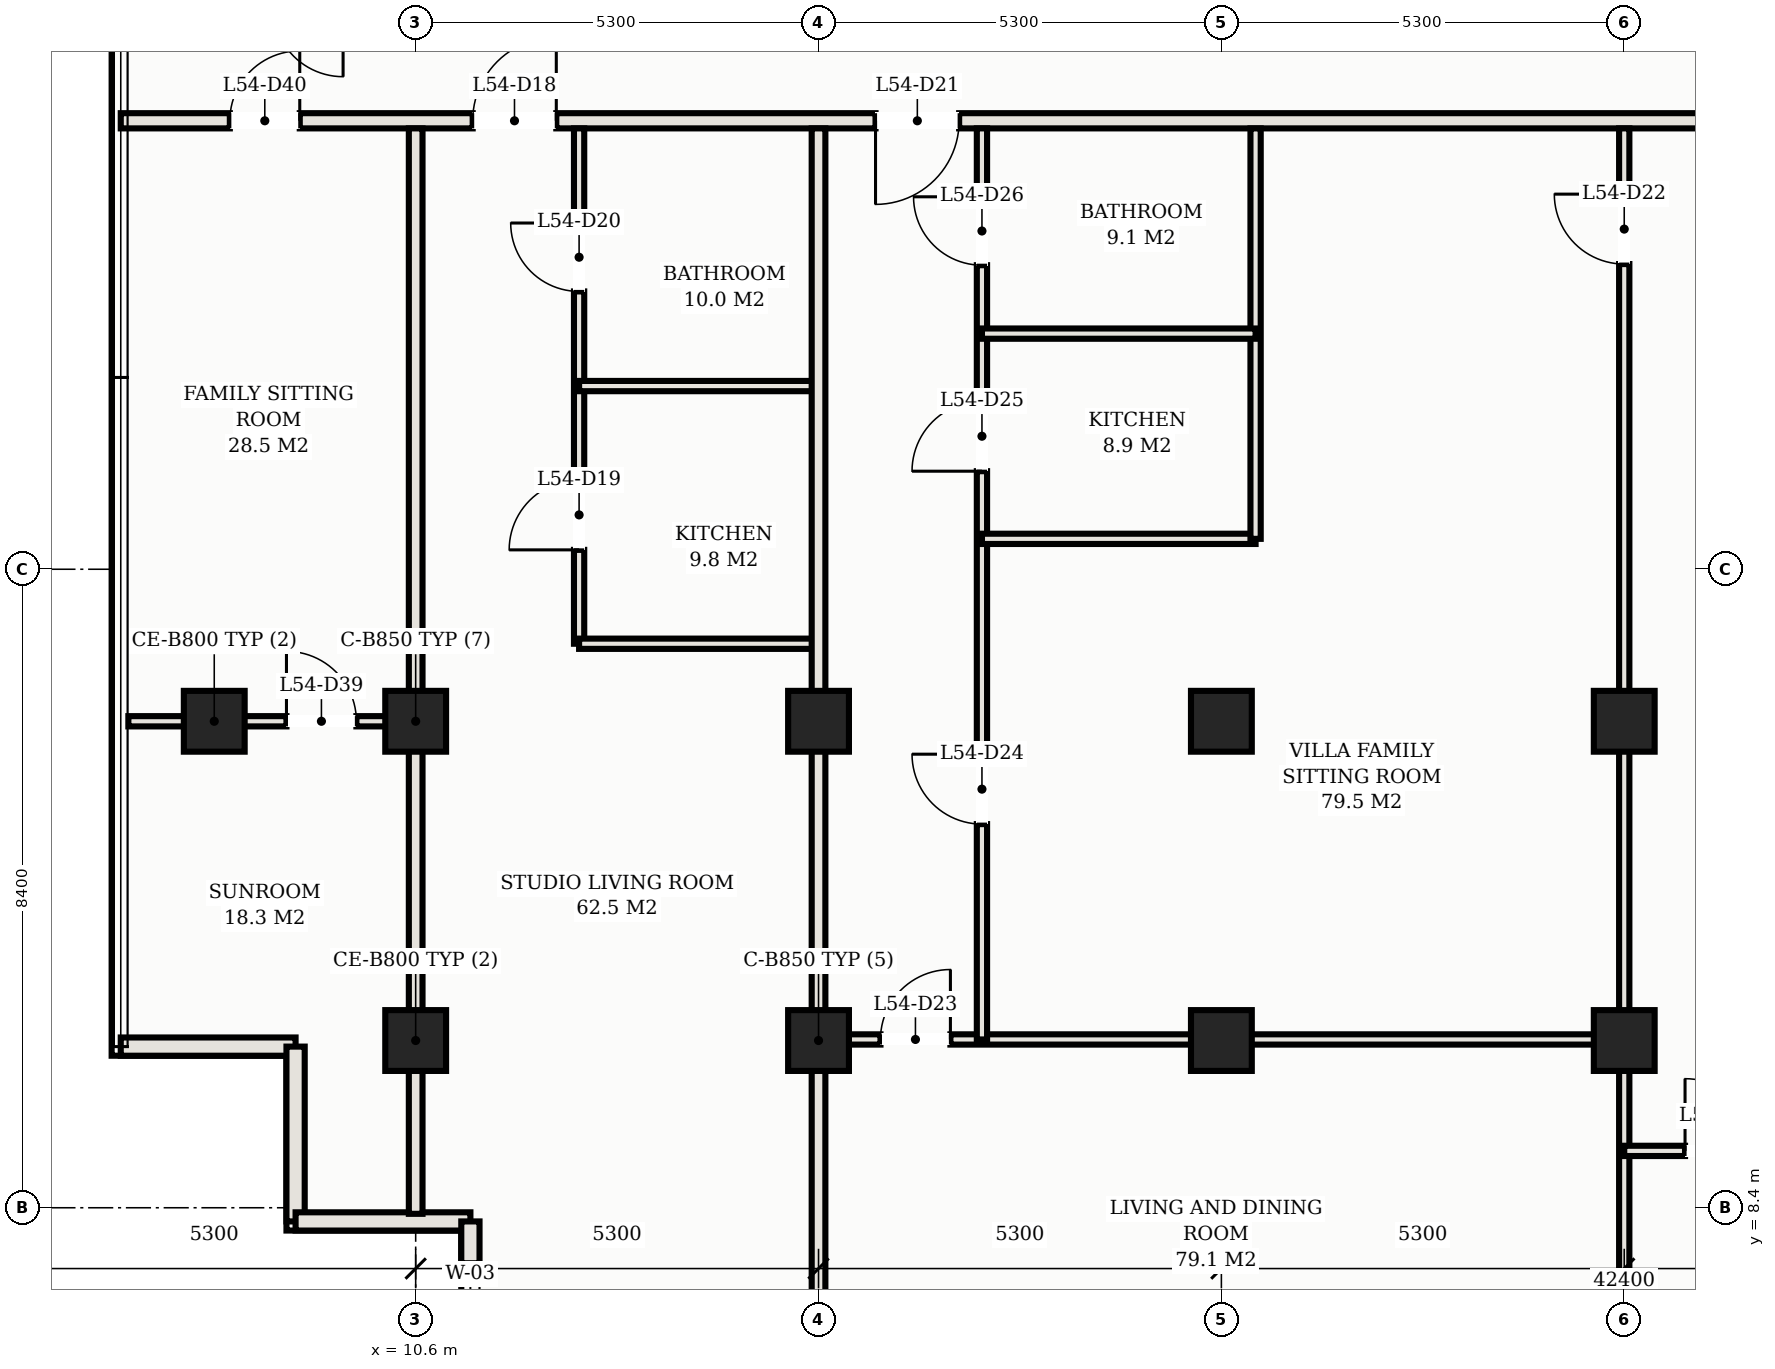
"""IFC4 building model, lengths in metres.
Left out: names, types, materials, properties, quantities, classifications, styles, units other than length and angle.
Written with IfcOpenShell. Run it as: python <this file> out.ifc"""

import sys

from ifc_helpers import new_model, si_unit, direction, frame, frame_2d, origin, origin_2d, place, context, subcontext, project, spatial, rectangle, hollow_rectangle, extrude, element, fill, save


model = new_model("IFC4")
c1 = context("Model", 3, precision=1e-05, world=origin(), true_north=direction((0.0, 1.0)))
c2 = subcontext(c1, "Body", "Model", "MODEL_VIEW")
j1 = project(units=[si_unit("LENGTHUNIT", "METRE"), si_unit("PLANEANGLEUNIT", "RADIAN")], contexts=[c1])
p1 = place(None, origin())
s1 = spatial("IfcSite", under=j1, at=p1, CompositionType="ELEMENT")
p2 = place(p1, origin())
s2 = spatial("IfcBuilding", under=s1, at=p2, CompositionType="ELEMENT")
p3 = place(p2, frame((0.0, 0.0, 200.0)))
s3 = spatial("IfcBuildingStorey", under=s2, at=p3, CompositionType="ELEMENT", Elevation=200.0)
for number, where, z_axis, x_axis in (
    (1, (10.6, 14.8, 0.0), (0.0, 0.0, 1.0), (1.0, 0.0, 0.0)),
    (2, (10.6, 10.6, 0.0), (0.0, 0.0, 1.0), (1.0, 0.0, 0.0)),
    (3, (15.9, 14.8, 0.0), (0.0, 0.0, 1.0), (1.0, 0.0, 0.0)),
    (4, (15.9, 10.6, 0.0), (0.0, 0.0, 1.0), (1.0, 0.0, 0.0)),
    (5, (21.2, 14.8, 0.0), (0.0, 0.0, 1.0), (1.0, 0.0, 0.0)),
    (6, (21.2, 10.6, 0.0), (0.0, 0.0, 1.0), (1.0, 0.0, 0.0)),
    (7, (26.5, 14.8, 0.0), (0.0, 0.0, 1.0), (1.0, 0.0, 0.0)),
    (8, (26.5, 10.6, 0.0), (0.0, 0.0, 1.0), (1.0, 0.0, 0.0)),
    (9, (7.95, 14.8, 0.0), (0.0, 0.0, 1.0), (1.0, 0.0, 0.0)),
):
    element("IfcColumn", number, at=place(p3, frame(where, z_axis=z_axis, x_axis=x_axis)), inside=s3, PredefinedType="COLUMN", context=c2, shape_type="SweptSolid", body=[
        extrude(hollow_rectangle(XDim=0.8, YDim=0.8, WallThickness=0.028, at=origin_2d()), origin(), (0.0, 0.0, 1.0), 3.3),
    ])
for number, where, z_axis, x_axis in (
    (10, (6.72, 10.52, 0.0), (0.0, 0.0, 1.0), (1.0, 0.0, 0.0)),
    (11, (9.02, 10.52, 0.0), (0.0, 0.0, 1.0), (0.0, -1.0, 0.0)),
    (12, (9.02, 8.22, 0.0), (0.0, 0.0, 1.0), (1.0, 0.0, 0.0)),
):
    element("IfcWall", number, at=place(p3, frame(where, z_axis=z_axis, x_axis=x_axis)), inside=s3, PredefinedType="SOLIDWALL", context=c2, shape_type="SweptSolid", body=[
        extrude(rectangle(XDim=2.3, YDim=0.24, at=frame_2d((1.15, 0.0))), origin(), (0.0, 0.0, 1.0), 3.11),
    ])
p4 = place(p3, frame((11.32, 8.22, 0.0), z_axis=(0.0, 0.0, 1.0), x_axis=(0.0, -1.0, 0.0)))
e13 = element("IfcWall", 13, at=p4, inside=s3, PredefinedType="SOLIDWALL", context=c2, shape_type="SweptSolid", body=[
    extrude(rectangle(XDim=2.3, YDim=0.24, at=frame_2d((1.15, 0.0))), origin(), (0.0, 0.0, 1.0), 3.11),
])
p5 = place(p4, frame((0.55, 0.0, 0.75)))
e14 = element("IfcOpeningElement", 14, at=p5, cuts=e13, PredefinedType="OPENING", context=c2, shape_type="SweptSolid", body=[
    extrude(rectangle(XDim=1.2, YDim=1.5, at=frame_2d((0.6, 0.75))), frame((0.0, 0.13, 0.0), z_axis=(0.0, -1.0, 0.0), x_axis=(1.0, 0.0, 0.0)), (0.0, 0.0, 1.0), 0.26),
])
p6 = place(p3, frame((6.72, 22.7, 0.0), z_axis=(0.0, 0.0, 1.0), x_axis=(1.0, 0.0, 0.0)))
e15 = element("IfcWall", 15, at=p6, inside=s3, PredefinedType="PARTITIONING", context=c2, shape_type="SweptSolid", body=[
    extrude(rectangle(XDim=39.56, YDim=0.2, at=frame_2d((19.78, 0.0))), origin(), (0.0, 0.0, 1.0), 2.43),
])
p7 = place(p6, frame((4.63, 0.0, 0.0)))
e16 = element("IfcOpeningElement", 16, at=p7, cuts=e15, PredefinedType="OPENING", context=c2, shape_type="SweptSolid", body=[
    extrude(rectangle(XDim=1.1, YDim=2.25, at=frame_2d((0.55, 1.125))), frame((0.0, 0.11, 0.0), z_axis=(0.0, -1.0, 0.0), x_axis=(1.0, 0.0, 0.0)), (0.0, 0.0, 1.0), 0.22),
])
p8 = place(p6, frame((9.93, 0.0, 0.0)))
e17 = element("IfcOpeningElement", 17, at=p8, cuts=e15, PredefinedType="OPENING", context=c2, shape_type="SweptSolid", body=[
    extrude(rectangle(XDim=1.1, YDim=2.25, at=frame_2d((0.55, 1.125))), frame((0.0, 0.11, 0.0), z_axis=(0.0, -1.0, 0.0), x_axis=(1.0, 0.0, 0.0)), (0.0, 0.0, 1.0), 0.22),
])
p9 = place(p6, frame((25.83, 0.0, 0.0)))
e18 = element("IfcOpeningElement", 18, at=p9, cuts=e15, PredefinedType="OPENING", context=c2, shape_type="SweptSolid", body=[
    extrude(rectangle(XDim=1.1, YDim=2.25, at=frame_2d((0.55, 1.125))), frame((0.0, 0.11, 0.0), z_axis=(0.0, -1.0, 0.0), x_axis=(1.0, 0.0, 0.0)), (0.0, 0.0, 1.0), 0.22),
])
p10 = place(p6, frame((1.435, 0.0, 0.0)))
e19 = element("IfcOpeningElement", 19, at=p10, cuts=e15, PredefinedType="OPENING", context=c2, shape_type="SweptSolid", body=[
    extrude(rectangle(XDim=0.92, YDim=2.15, at=frame_2d((0.46, 1.075))), frame((0.0, 0.11, 0.0), z_axis=(0.0, -1.0, 0.0), x_axis=(1.0, 0.0, 0.0)), (0.0, 0.0, 1.0), 0.22),
])
p11 = place(p6, frame((37.205, 0.0, 0.0)))
e20 = element("IfcOpeningElement", 20, at=p11, cuts=e15, PredefinedType="OPENING", context=c2, shape_type="SweptSolid", body=[
    extrude(rectangle(XDim=0.92, YDim=2.15, at=frame_2d((0.46, 1.075))), frame((0.0, 0.11, 0.0), z_axis=(0.0, -1.0, 0.0), x_axis=(1.0, 0.0, 0.0)), (0.0, 0.0, 1.0), 0.22),
])
p12 = place(p3, frame((10.6, 8.32, 0.0), z_axis=(0.0, 0.0, 1.0), x_axis=(0.0, 1.0, 0.0)))
e21 = element("IfcWall", 21, at=p12, inside=s3, PredefinedType="PARTITIONING", context=c2, shape_type="SweptSolid", body=[
    extrude(rectangle(XDim=14.28, YDim=0.18, at=frame_2d((7.14, 0.0))), origin(), (0.0, 0.0, 1.0), 2.43),
])
p13 = place(p3, frame((12.75, 15.82, 0.0), z_axis=(0.0, 0.0, 1.0), x_axis=(0.0, 1.0, 0.0)))
e22 = element("IfcWall", 22, at=p13, inside=s3, PredefinedType="PARTITIONING", context=c2, shape_type="SweptSolid", body=[
    extrude(rectangle(XDim=6.78, YDim=0.135, at=frame_2d((3.39, 0.0))), origin(), (0.0, 0.0, 1.0), 2.43),
])
p14 = place(p13, frame((1.235, 0.0, 0.0)))
e23 = element("IfcOpeningElement", 23, at=p14, cuts=e22, PredefinedType="OPENING", context=c2, shape_type="SweptSolid", body=[
    extrude(rectangle(XDim=0.92, YDim=2.15, at=frame_2d((0.46, 1.075))), frame((0.0, 0.078, 0.0), z_axis=(0.0, -1.0, 0.0), x_axis=(1.0, 0.0, 0.0)), (0.0, 0.0, 1.0), 0.155),
])
p15 = place(p13, frame((4.635, 0.0, 0.0)))
e24 = element("IfcOpeningElement", 24, at=p15, cuts=e22, PredefinedType="OPENING", context=c2, shape_type="SweptSolid", body=[
    extrude(rectangle(XDim=0.9, YDim=2.15, at=frame_2d((0.45, 1.075))), frame((0.0, 0.078, 0.0), z_axis=(0.0, -1.0, 0.0), x_axis=(1.0, 0.0, 0.0)), (0.0, 0.0, 1.0), 0.155),
])
for number, where, z_axis, x_axis in (
    (25, (12.75, 15.82, 0.0), (0.0, 0.0, 1.0), (1.0, 0.0, 0.0)),
    (26, (12.75, 19.21, 0.0), (0.0, 0.0, 1.0), (1.0, 0.0, 0.0)),
):
    element("IfcWall", number, at=place(p3, frame(where, z_axis=z_axis, x_axis=x_axis)), inside=s3, PredefinedType="PARTITIONING", context=c2, shape_type="SweptSolid", body=[
        extrude(rectangle(XDim=3.15, YDim=0.135, at=frame_2d((1.575, 0.0))), origin(), (0.0, 0.0, 1.0), 2.43),
    ])
p16 = place(p3, frame((15.9, 6.02, 0.0), z_axis=(0.0, 0.0, 1.0), x_axis=(0.0, 1.0, 0.0)))
e27 = element("IfcWall", 27, at=p16, inside=s3, PredefinedType="PARTITIONING", context=c2, shape_type="SweptSolid", body=[
    extrude(rectangle(XDim=16.58, YDim=0.18, at=frame_2d((8.29, 0.0))), origin(), (0.0, 0.0, 1.0), 2.43),
])
p17 = place(p3, frame((26.5, 4.42, 0.0), z_axis=(0.0, 0.0, 1.0), x_axis=(0.0, 1.0, 0.0)))
e28 = element("IfcWall", 28, at=p17, inside=s3, PredefinedType="PARTITIONING", context=c2, shape_type="SweptSolid", body=[
    extrude(rectangle(XDim=18.18, YDim=0.135, at=frame_2d((9.09, 0.0))), origin(), (0.0, 0.0, 1.0), 2.43),
])
p18 = place(p17, frame((16.395, 0.0, 0.0)))
e29 = element("IfcOpeningElement", 29, at=p18, cuts=e28, PredefinedType="OPENING", context=c2, shape_type="SweptSolid", body=[
    extrude(rectangle(XDim=0.92, YDim=2.15, at=frame_2d((0.46, 1.075))), frame((0.0, 0.078, 0.0), z_axis=(0.0, -1.0, 0.0), x_axis=(1.0, 0.0, 0.0)), (0.0, 0.0, 1.0), 0.155),
])
p19 = place(p3, frame((15.9, 10.614, 0.0), z_axis=(0.0, 0.0, 1.0), x_axis=(1.0, 0.0, 0.0)))
e30 = element("IfcWall", 30, at=p19, inside=s3, PredefinedType="PARTITIONING", context=c2, shape_type="SweptSolid", body=[
    extrude(rectangle(XDim=10.6, YDim=0.135, at=frame_2d((5.3, 0.0))), origin(), (0.0, 0.0, 1.0), 2.43),
])
p20 = place(p19, frame((0.815, 0.0, 0.0)))
e31 = element("IfcOpeningElement", 31, at=p20, cuts=e30, PredefinedType="OPENING", context=c2, shape_type="SweptSolid", body=[
    extrude(rectangle(XDim=0.92, YDim=2.15, at=frame_2d((0.46, 1.075))), frame((0.0, 0.078, 0.0), z_axis=(0.0, -1.0, 0.0), x_axis=(1.0, 0.0, 0.0)), (0.0, 0.0, 1.0), 0.155),
])
p21 = place(p3, frame((18.05, 10.614, 0.0), z_axis=(0.0, 0.0, 1.0), x_axis=(0.0, 1.0, 0.0)))
e32 = element("IfcWall", 32, at=p21, inside=s3, PredefinedType="PARTITIONING", context=c2, shape_type="SweptSolid", body=[
    extrude(rectangle(XDim=11.986, YDim=0.135, at=frame_2d((5.993, 0.0))), origin(), (0.0, 0.0, 1.0), 2.43),
])
p22 = place(p21, frame((2.833, 0.0, 0.0)))
e33 = element("IfcOpeningElement", 33, at=p22, cuts=e32, PredefinedType="OPENING", context=c2, shape_type="SweptSolid", body=[
    extrude(rectangle(XDim=0.92, YDim=2.15, at=frame_2d((0.46, 1.075))), frame((0.0, 0.078, 0.0), z_axis=(0.0, -1.0, 0.0), x_axis=(1.0, 0.0, 0.0)), (0.0, 0.0, 1.0), 0.155),
])
p23 = place(p21, frame((7.476, 0.0, 0.0)))
e34 = element("IfcOpeningElement", 34, at=p23, cuts=e32, PredefinedType="OPENING", context=c2, shape_type="SweptSolid", body=[
    extrude(rectangle(XDim=0.92, YDim=2.15, at=frame_2d((0.46, 1.075))), frame((0.0, 0.078, 0.0), z_axis=(0.0, -1.0, 0.0), x_axis=(1.0, 0.0, 0.0)), (0.0, 0.0, 1.0), 0.155),
])
p24 = place(p21, frame((10.186, 0.0, 0.0)))
e35 = element("IfcOpeningElement", 35, at=p24, cuts=e32, PredefinedType="OPENING", context=c2, shape_type="SweptSolid", body=[
    extrude(rectangle(XDim=0.9, YDim=2.15, at=frame_2d((0.45, 1.075))), frame((0.0, 0.078, 0.0), z_axis=(0.0, -1.0, 0.0), x_axis=(1.0, 0.0, 0.0)), (0.0, 0.0, 1.0), 0.155),
])
p25 = place(p3, frame((18.05, 17.2, 0.0), z_axis=(0.0, 0.0, 1.0), x_axis=(1.0, 0.0, 0.0)))
e36 = element("IfcWall", 36, at=p25, inside=s3, PredefinedType="PARTITIONING", context=c2, shape_type="SweptSolid", body=[
    extrude(rectangle(XDim=3.6, YDim=0.135, at=frame_2d((1.8, 0.0))), origin(), (0.0, 0.0, 1.0), 2.43),
])
p26 = place(p3, frame((21.65, 17.2, 0.0), z_axis=(0.0, 0.0, 1.0), x_axis=(0.0, 1.0, 0.0)))
e37 = element("IfcWall", 37, at=p26, inside=s3, PredefinedType="PARTITIONING", context=c2, shape_type="SweptSolid", body=[
    extrude(rectangle(XDim=5.4, YDim=0.135, at=frame_2d((2.7, 0.0))), origin(), (0.0, 0.0, 1.0), 2.43),
])
p27 = place(p3, frame((18.05, 19.9, 0.0), z_axis=(0.0, 0.0, 1.0), x_axis=(1.0, 0.0, 0.0)))
e38 = element("IfcWall", 38, at=p27, inside=s3, PredefinedType="PARTITIONING", context=c2, shape_type="SweptSolid", body=[
    extrude(rectangle(XDim=3.6, YDim=0.135, at=frame_2d((1.8, 0.0))), origin(), (0.0, 0.0, 1.0), 2.43),
])
p28 = place(p3, frame((26.5, 9.148, 0.0), z_axis=(0.0, 0.0, 1.0), x_axis=(1.0, 0.0, 0.0)))
e39 = element("IfcWall", 39, at=p28, inside=s3, PredefinedType="PARTITIONING", context=c2, shape_type="SweptSolid", body=[
    extrude(rectangle(XDim=5.3, YDim=0.135, at=frame_2d((2.65, 0.0))), origin(), (0.0, 0.0, 1.0), 2.43),
])
p29 = place(p28, frame((0.8, 0.0, 0.0)))
e40 = element("IfcOpeningElement", 40, at=p29, cuts=e39, PredefinedType="OPENING", context=c2, shape_type="SweptSolid", body=[
    extrude(rectangle(XDim=0.95, YDim=2.15, at=frame_2d((0.475, 1.075))), frame((0.0, 0.078, 0.0), z_axis=(0.0, -1.0, 0.0), x_axis=(1.0, 0.0, 0.0)), (0.0, 0.0, 1.0), 0.155),
])
p30 = place(p28, frame((3.275, 0.0, 0.0)))
e41 = element("IfcOpeningElement", 41, at=p30, cuts=e39, PredefinedType="OPENING", context=c2, shape_type="SweptSolid", body=[
    extrude(rectangle(XDim=0.9, YDim=2.15, at=frame_2d((0.45, 1.075))), frame((0.0, 0.078, 0.0), z_axis=(0.0, -1.0, 0.0), x_axis=(1.0, 0.0, 0.0)), (0.0, 0.0, 1.0), 0.155),
])
p31 = place(p3, frame((6.82, 14.8, 0.0), z_axis=(0.0, 0.0, 1.0), x_axis=(1.0, 0.0, 0.0)))
e42 = element("IfcWall", 42, at=p31, inside=s3, PredefinedType="PARTITIONING", context=c2, shape_type="SweptSolid", body=[
    extrude(rectangle(XDim=3.78, YDim=0.135, at=frame_2d((1.89, 0.0))), origin(), (0.0, 0.0, 1.0), 2.43),
])
p32 = place(p31, frame((2.08, 0.0, 0.0)))
e43 = element("IfcOpeningElement", 43, at=p32, cuts=e42, PredefinedType="OPENING", context=c2, shape_type="SweptSolid", body=[
    extrude(rectangle(XDim=0.92, YDim=2.15, at=frame_2d((0.46, 1.075))), frame((0.0, 0.078, 0.0), z_axis=(0.0, -1.0, 0.0), x_axis=(1.0, 0.0, 0.0)), (0.0, 0.0, 1.0), 0.155),
])
p33 = place(p5, origin())
e44 = element("IfcWindow", 44, at=p33, inside=s3, PartitioningType="SINGLE_PANEL", PredefinedType="WINDOW", context=c2, shape_type="SweptSolid", body=[
    extrude(rectangle(XDim=1.2, YDim=1.5, at=frame_2d((0.6, 0.75))), frame((0.0, 0.03, 0.0), z_axis=(0.0, -1.0, 0.0), x_axis=(1.0, 0.0, 0.0)), (0.0, 0.0, 1.0), 0.06),
])
fill(e14, e44)
p34 = place(p7, origin())
e45 = element("IfcDoor", 45, at=p34, inside=s3, OperationType="SINGLE_SWING_RIGHT", PredefinedType="DOOR", context=c2, shape_type="SweptSolid", body=[
    extrude(rectangle(XDim=1.1, YDim=2.25, at=frame_2d((0.55, 1.125))), frame((0.0, 0.025, 0.0), z_axis=(0.0, -1.0, 0.0), x_axis=(1.0, 0.0, 0.0)), (0.0, 0.0, 1.0), 0.05),
])
fill(e16, e45)
p35 = place(p14, origin())
e46 = element("IfcDoor", 46, at=p35, inside=s3, OperationType="SINGLE_SWING_LEFT", PredefinedType="DOOR", context=c2, shape_type="SweptSolid", body=[
    extrude(rectangle(XDim=0.92, YDim=2.15, at=frame_2d((0.46, 1.075))), frame((0.0, 0.025, 0.0), z_axis=(0.0, -1.0, 0.0), x_axis=(1.0, 0.0, 0.0)), (0.0, 0.0, 1.0), 0.05),
])
fill(e23, e46)
p36 = place(p15, origin())
e47 = element("IfcDoor", 47, at=p36, inside=s3, OperationType="SINGLE_SWING_RIGHT", PredefinedType="DOOR", context=c2, shape_type="SweptSolid", body=[
    extrude(rectangle(XDim=0.9, YDim=2.15, at=frame_2d((0.45, 1.075))), frame((0.0, 0.025, 0.0), z_axis=(0.0, -1.0, 0.0), x_axis=(1.0, 0.0, 0.0)), (0.0, 0.0, 1.0), 0.05),
])
fill(e24, e47)
p37 = place(p8, frame((1.1, 0.0, 0.0), z_axis=(0.0, 0.0, 1.0), x_axis=(-1.0, 0.0, 0.0)))
e48 = element("IfcDoor", 48, at=p37, inside=s3, OperationType="SINGLE_SWING_RIGHT", PredefinedType="DOOR", context=c2, shape_type="SweptSolid", body=[
    extrude(rectangle(XDim=1.1, YDim=2.25, at=frame_2d((0.55, 1.125))), frame((0.0, 0.025, 0.0), z_axis=(0.0, -1.0, 0.0), x_axis=(1.0, 0.0, 0.0)), (0.0, 0.0, 1.0), 0.05),
])
fill(e17, e48)
p38 = place(p18, origin())
e49 = element("IfcDoor", 49, at=p38, inside=s3, OperationType="SINGLE_SWING_RIGHT", PredefinedType="DOOR", context=c2, shape_type="SweptSolid", body=[
    extrude(rectangle(XDim=0.92, YDim=2.15, at=frame_2d((0.46, 1.075))), frame((0.0, 0.025, 0.0), z_axis=(0.0, -1.0, 0.0), x_axis=(1.0, 0.0, 0.0)), (0.0, 0.0, 1.0), 0.05),
])
fill(e29, e49)
p39 = place(p20, origin())
e50 = element("IfcDoor", 50, at=p39, inside=s3, OperationType="SINGLE_SWING_RIGHT", PredefinedType="DOOR", context=c2, shape_type="SweptSolid", body=[
    extrude(rectangle(XDim=0.92, YDim=2.15, at=frame_2d((0.46, 1.075))), frame((0.0, 0.025, 0.0), z_axis=(0.0, -1.0, 0.0), x_axis=(1.0, 0.0, 0.0)), (0.0, 0.0, 1.0), 0.05),
])
fill(e31, e50)
p40 = place(p22, origin())
e51 = element("IfcDoor", 51, at=p40, inside=s3, OperationType="SINGLE_SWING_RIGHT", PredefinedType="DOOR", context=c2, shape_type="SweptSolid", body=[
    extrude(rectangle(XDim=0.92, YDim=2.15, at=frame_2d((0.46, 1.075))), frame((0.0, 0.025, 0.0), z_axis=(0.0, -1.0, 0.0), x_axis=(1.0, 0.0, 0.0)), (0.0, 0.0, 1.0), 0.05),
])
fill(e33, e51)
p41 = place(p23, origin())
e52 = element("IfcDoor", 52, at=p41, inside=s3, OperationType="SINGLE_SWING_LEFT", PredefinedType="DOOR", context=c2, shape_type="SweptSolid", body=[
    extrude(rectangle(XDim=0.92, YDim=2.15, at=frame_2d((0.46, 1.075))), frame((0.0, 0.025, 0.0), z_axis=(0.0, -1.0, 0.0), x_axis=(1.0, 0.0, 0.0)), (0.0, 0.0, 1.0), 0.05),
])
fill(e34, e52)
p42 = place(p24, origin())
e53 = element("IfcDoor", 53, at=p42, inside=s3, OperationType="SINGLE_SWING_RIGHT", PredefinedType="DOOR", context=c2, shape_type="SweptSolid", body=[
    extrude(rectangle(XDim=0.9, YDim=2.15, at=frame_2d((0.45, 1.075))), frame((0.0, 0.025, 0.0), z_axis=(0.0, -1.0, 0.0), x_axis=(1.0, 0.0, 0.0)), (0.0, 0.0, 1.0), 0.05),
])
fill(e35, e53)
p43 = place(p29, origin())
e54 = element("IfcDoor", 54, at=p43, inside=s3, OperationType="SINGLE_SWING_LEFT", PredefinedType="DOOR", context=c2, shape_type="SweptSolid", body=[
    extrude(rectangle(XDim=0.95, YDim=2.15, at=frame_2d((0.475, 1.075))), frame((0.0, 0.025, 0.0), z_axis=(0.0, -1.0, 0.0), x_axis=(1.0, 0.0, 0.0)), (0.0, 0.0, 1.0), 0.05),
])
fill(e40, e54)
p44 = place(p32, origin())
e55 = element("IfcDoor", 55, at=p44, inside=s3, OperationType="SINGLE_SWING_LEFT", PredefinedType="DOOR", context=c2, shape_type="SweptSolid", body=[
    extrude(rectangle(XDim=0.92, YDim=2.15, at=frame_2d((0.46, 1.075))), frame((0.0, 0.025, 0.0), z_axis=(0.0, -1.0, 0.0), x_axis=(1.0, 0.0, 0.0)), (0.0, 0.0, 1.0), 0.05),
])
fill(e43, e55)
p45 = place(p10, origin())
e56 = element("IfcDoor", 56, at=p45, inside=s3, OperationType="SINGLE_SWING_RIGHT", PredefinedType="DOOR", context=c2, shape_type="SweptSolid", body=[
    extrude(rectangle(XDim=0.92, YDim=2.15, at=frame_2d((0.46, 1.075))), frame((0.0, 0.025, 0.0), z_axis=(0.0, -1.0, 0.0), x_axis=(1.0, 0.0, 0.0)), (0.0, 0.0, 1.0), 0.05),
])
fill(e19, e56)
save(model, sys.argv[1])
